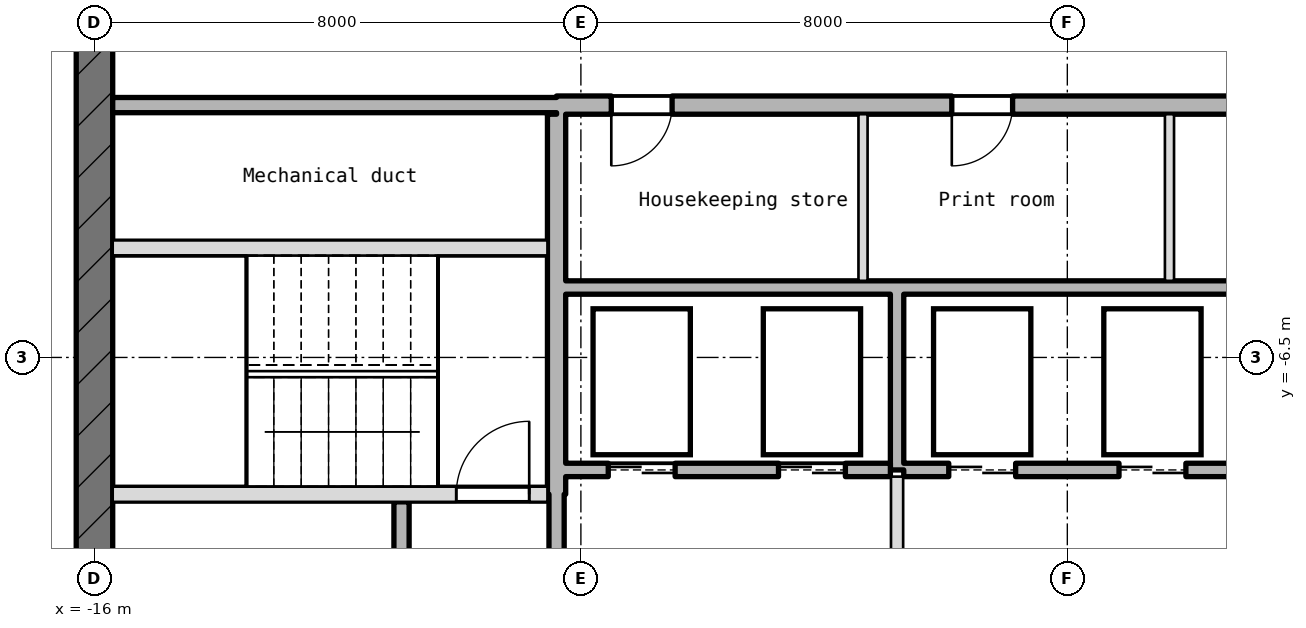
"""IFC4 building model, lengths in metres.
Left out: names, types, materials, properties, quantities, classifications, styles, units other than length and angle.
Written with IfcOpenShell. Run it as: python <this file> out.ifc"""

import sys

from ifc_helpers import new_model, si_unit, direction, frame, frame_2d, origin, place, context, subcontext, project, spatial, rectangle, extrude, element, fill, save


model = new_model("IFC4")
c1 = context("Model", 3, precision=1e-05, world=origin(), true_north=direction((0.0, 1.0)))
c2 = subcontext(c1, "Body", "Model", "MODEL_VIEW")
j1 = project(units=[si_unit("LENGTHUNIT", "METRE"), si_unit("PLANEANGLEUNIT", "RADIAN")], contexts=[c1])
p1 = place(None, origin())
s1 = spatial("IfcSite", under=j1, at=p1, CompositionType="ELEMENT")
p2 = place(p1, origin())
s2 = spatial("IfcBuilding", under=s1, at=p2, CompositionType="ELEMENT")
p3 = place(p2, frame((0.0, 0.0, 418.55)))
s3 = spatial("IfcBuildingStorey", under=s2, at=p3, CompositionType="ELEMENT", Elevation=418.55)
p4 = place(p3, frame((-16.0, 10.124, -0.2), z_axis=(0.0, 0.0, 1.0), x_axis=(0.0, -1.0, 0.0)))
e1 = element("IfcWall", 1, at=p4, inside=s3, PredefinedType="SHEAR", context=c2, shape_type="SweptSolid", body=[
    extrude(rectangle(XDim=20.249, YDim=0.6, at=frame_2d((10.124, 0.0))), origin(), (0.0, 0.0, 1.0), 4.9),
])
p5 = place(p4, frame((8.924, 0.0, 0.2)))
e2 = element("IfcOpeningElement", 2, at=p5, cuts=e1, PredefinedType="OPENING", context=c2, shape_type="SweptSolid", body=[
    extrude(rectangle(XDim=2.4, YDim=2.1, at=frame_2d((1.2, 1.05))), frame((0.0, 0.31, 0.0), z_axis=(0.0, -1.0, 0.0), x_axis=(1.0, 0.0, 0.0)), (0.0, 0.0, 1.0), 0.62),
])
p6 = place(p4, frame((5.524, 0.0, 0.2)))
e3 = element("IfcOpeningElement", 3, at=p6, cuts=e1, PredefinedType="OPENING", context=c2, shape_type="SweptSolid", body=[
    extrude(rectangle(XDim=1.2, YDim=2.1, at=frame_2d((0.6, 1.05))), frame((0.0, 0.31, 0.0), z_axis=(0.0, -1.0, 0.0), x_axis=(1.0, 0.0, 0.0)), (0.0, 0.0, 1.0), 0.62),
])
p7 = place(p3, frame((-15.7, -8.75, -0.2), z_axis=(0.0, 0.0, 1.0), x_axis=(1.0, 0.0, 0.0)))
e4 = element("IfcWall", 4, at=p7, inside=s3, PredefinedType="SHEAR", context=c2, shape_type="SweptSolid", body=[
    extrude(rectangle(XDim=7.15, YDim=0.25, at=frame_2d((3.575, 0.0))), origin(), (0.0, 0.0, 1.0), 4.9),
])
p8 = place(p7, frame((5.65, 0.0, 0.2)))
e5 = element("IfcOpeningElement", 5, at=p8, cuts=e4, PredefinedType="OPENING", context=c2, shape_type="SweptSolid", body=[
    extrude(rectangle(XDim=1.2, YDim=2.1, at=frame_2d((0.6, 1.05))), frame((0.0, 0.135, 0.0), z_axis=(0.0, -1.0, 0.0), x_axis=(1.0, 0.0, 0.0)), (0.0, 0.0, 1.0), 0.27),
])
p9 = place(p3, frame((-8.25, -8.35, 0.0), z_axis=(0.0, 0.0, 1.0), x_axis=(1.0, 0.0, 0.0)))
e6 = element("IfcWall", 6, at=p9, inside=s3, PredefinedType="STANDARD", context=c2, shape_type="SweptSolid", body=[
    extrude(rectangle(XDim=5.34, YDim=0.22, at=frame_2d((2.67, 0.0))), origin(), (0.0, 0.0, 1.0), 4.7),
])
p10 = place(p9, frame((0.7, 0.0, 0.0)))
e7 = element("IfcOpeningElement", 7, at=p10, cuts=e6, PredefinedType="OPENING", context=c2, shape_type="SweptSolid", body=[
    extrude(rectangle(XDim=1.1, YDim=2.1, at=frame_2d((0.55, 1.05))), frame((0.0, 0.12, 0.0), z_axis=(0.0, -1.0, 0.0), x_axis=(1.0, 0.0, 0.0)), (0.0, 0.0, 1.0), 0.24),
])
p11 = place(p9, frame((3.5, 0.0, 0.0)))
e8 = element("IfcOpeningElement", 8, at=p11, cuts=e6, PredefinedType="OPENING", context=c2, shape_type="SweptSolid", body=[
    extrude(rectangle(XDim=1.1, YDim=2.1, at=frame_2d((0.55, 1.05))), frame((0.0, 0.12, 0.0), z_axis=(0.0, -1.0, 0.0), x_axis=(1.0, 0.0, 0.0)), (0.0, 0.0, 1.0), 0.24),
])
p12 = place(p3, frame((-2.69, -8.35, 0.0), z_axis=(0.0, 0.0, 1.0), x_axis=(1.0, 0.0, 0.0)))
e9 = element("IfcWall", 9, at=p12, inside=s3, PredefinedType="STANDARD", context=c2, shape_type="SweptSolid", body=[
    extrude(rectangle(XDim=10.94, YDim=0.22, at=frame_2d((5.47, 0.0))), origin(), (0.0, 0.0, 1.0), 4.7),
])
p13 = place(p12, frame((0.74, 0.0, 0.0)))
e10 = element("IfcOpeningElement", 10, at=p13, cuts=e9, PredefinedType="OPENING", context=c2, shape_type="SweptSolid", body=[
    extrude(rectangle(XDim=1.1, YDim=2.1, at=frame_2d((0.55, 1.05))), frame((0.0, 0.12, 0.0), z_axis=(0.0, -1.0, 0.0), x_axis=(1.0, 0.0, 0.0)), (0.0, 0.0, 1.0), 0.24),
])
p14 = place(p12, frame((3.54, 0.0, 0.0)))
e11 = element("IfcOpeningElement", 11, at=p14, cuts=e9, PredefinedType="OPENING", context=c2, shape_type="SweptSolid", body=[
    extrude(rectangle(XDim=1.1, YDim=2.1, at=frame_2d((0.55, 1.05))), frame((0.0, 0.12, 0.0), z_axis=(0.0, -1.0, 0.0), x_axis=(1.0, 0.0, 0.0)), (0.0, 0.0, 1.0), 0.24),
])
p15 = place(p3, frame((-8.25, -5.35, 0.0), z_axis=(0.0, 0.0, 1.0), x_axis=(1.0, 0.0, 0.0)))
e12 = element("IfcWall", 12, at=p15, inside=s3, PredefinedType="STANDARD", context=c2, shape_type="SweptSolid", body=[
    extrude(rectangle(XDim=16.5, YDim=0.22, at=frame_2d((8.25, 0.0))), origin(), (0.0, 0.0, 1.0), 4.7),
])
p16 = place(p3, frame((-15.7, -4.7, -0.2), z_axis=(0.0, 0.0, 1.0), x_axis=(1.0, 0.0, 0.0)))
e13 = element("IfcWall", 13, at=p16, inside=s3, PredefinedType="SHEAR", context=c2, shape_type="SweptSolid", body=[
    extrude(rectangle(XDim=7.15, YDim=0.25, at=frame_2d((3.575, 0.0))), origin(), (0.0, 0.0, 1.0), 4.9),
])
p17 = place(p3, frame((-15.7, -2.35, 0.0), z_axis=(0.0, 0.0, 1.0), x_axis=(1.0, 0.0, 0.0)))
e14 = element("IfcWall", 14, at=p17, inside=s3, PredefinedType="STANDARD", context=c2, shape_type="SweptSolid", body=[
    extrude(rectangle(XDim=7.3, YDim=0.25, at=frame_2d((3.65, 0.0))), origin(), (0.0, 0.0, 1.0), 4.7),
])
p18 = place(p3, frame((-8.4, -2.35, -0.2), z_axis=(0.0, 0.0, 1.0), x_axis=(1.0, 0.0, 0.0)))
e15 = element("IfcWall", 15, at=p18, inside=s3, PredefinedType="SHEAR", context=c2, shape_type="SweptSolid", body=[
    extrude(rectangle(XDim=16.8, YDim=0.3, at=frame_2d((8.4, 0.0))), origin(), (0.0, 0.0, 1.0), 4.9),
])
p19 = place(p18, frame((0.9, 0.0, 0.2)))
e16 = element("IfcOpeningElement", 16, at=p19, cuts=e15, PredefinedType="OPENING", context=c2, shape_type="SweptSolid", body=[
    extrude(rectangle(XDim=1.0, YDim=2.1, at=frame_2d((0.5, 1.05))), frame((0.0, 0.16, 0.0), z_axis=(0.0, -1.0, 0.0), x_axis=(1.0, 0.0, 0.0)), (0.0, 0.0, 1.0), 0.32),
])
p20 = place(p18, frame((6.5, 0.0, 0.2)))
e17 = element("IfcOpeningElement", 17, at=p20, cuts=e15, PredefinedType="OPENING", context=c2, shape_type="SweptSolid", body=[
    extrude(rectangle(XDim=1.0, YDim=2.1, at=frame_2d((0.5, 1.05))), frame((0.0, 0.16, 0.0), z_axis=(0.0, -1.0, 0.0), x_axis=(1.0, 0.0, 0.0)), (0.0, 0.0, 1.0), 0.32),
])
p21 = place(p18, frame((14.9, 0.0, 0.2)))
e18 = element("IfcOpeningElement", 18, at=p21, cuts=e15, PredefinedType="OPENING", context=c2, shape_type="SweptSolid", body=[
    extrude(rectangle(XDim=1.0, YDim=2.1, at=frame_2d((0.5, 1.05))), frame((0.0, 0.16, 0.0), z_axis=(0.0, -1.0, 0.0), x_axis=(1.0, 0.0, 0.0)), (0.0, 0.0, 1.0), 0.32),
])
p22 = place(p3, frame((-10.95, -12.7, 0.0), z_axis=(0.0, 0.0, 1.0), x_axis=(0.0, 1.0, 0.0)))
e19 = element("IfcWall", 19, at=p22, inside=s3, PredefinedType="STANDARD", context=c2, shape_type="SweptSolid", body=[
    extrude(rectangle(XDim=3.825, YDim=0.25, at=frame_2d((1.913, 0.0))), origin(), (0.0, 0.0, 1.0), 4.7),
])
p23 = place(p3, frame((-8.4, -12.7, 0.0), z_axis=(0.0, 0.0, 1.0), x_axis=(0.0, 1.0, 0.0)))
e20 = element("IfcWall", 20, at=p23, inside=s3, PredefinedType="STANDARD", context=c2, shape_type="SweptSolid", body=[
    extrude(rectangle(XDim=3.95, YDim=0.25, at=frame_2d((1.975, 0.0))), origin(), (0.0, 0.0, 1.0), 4.7),
])
p24 = place(p23, frame((1.6, 0.0, 0.0)))
e21 = element("IfcOpeningElement", 21, at=p24, cuts=e20, PredefinedType="OPENING", context=c2, shape_type="SweptSolid", body=[
    extrude(rectangle(XDim=1.1, YDim=2.1, at=frame_2d((0.55, 1.05))), frame((0.0, 0.135, 0.0), z_axis=(0.0, -1.0, 0.0), x_axis=(1.0, 0.0, 0.0)), (0.0, 0.0, 1.0), 0.27),
])
p25 = place(p3, frame((-8.4, -8.75, -0.2), z_axis=(0.0, 0.0, 1.0), x_axis=(0.0, 1.0, 0.0)))
e22 = element("IfcWall", 22, at=p25, inside=s3, PredefinedType="SHEAR", context=c2, shape_type="SweptSolid", body=[
    extrude(rectangle(XDim=6.25, YDim=0.3, at=frame_2d((3.125, 0.0))), origin(), (0.0, 0.0, 1.0), 4.9),
])
p26 = place(p3, frame((-3.36, -5.24, 0.0), z_axis=(0.0, 0.0, 1.0), x_axis=(0.0, 1.0, 0.0)))
e23 = element("IfcWall", 23, at=p26, inside=s3, PredefinedType="PARTITIONING", context=c2, shape_type="SweptSolid", body=[
    extrude(rectangle(XDim=2.74, YDim=0.15, at=frame_2d((1.37, 0.0))), origin(), (0.0, 0.0, 1.0), 4.7),
])
p27 = place(p3, frame((-2.8, -12.7, 0.0), z_axis=(0.0, 0.0, 1.0), x_axis=(0.0, 1.0, 0.0)))
e24 = element("IfcWall", 24, at=p27, inside=s3, PredefinedType="PARTITIONING", context=c2, shape_type="SweptSolid", body=[
    extrude(rectangle(XDim=4.24, YDim=0.2, at=frame_2d((2.12, 0.0))), origin(), (0.0, 0.0, 1.0), 4.7),
])
p28 = place(p3, frame((-2.8, -8.35, 0.0), z_axis=(0.0, 0.0, 1.0), x_axis=(0.0, 1.0, 0.0)))
e25 = element("IfcWall", 25, at=p28, inside=s3, PredefinedType="STANDARD", context=c2, shape_type="SweptSolid", body=[
    extrude(rectangle(XDim=2.89, YDim=0.22, at=frame_2d((1.445, 0.0))), origin(), (0.0, 0.0, 1.0), 4.7),
])
p29 = place(p3, frame((1.68, -5.24, 0.0), z_axis=(0.0, 0.0, 1.0), x_axis=(0.0, 1.0, 0.0)))
e26 = element("IfcWall", 26, at=p29, inside=s3, PredefinedType="PARTITIONING", context=c2, shape_type="SweptSolid", body=[
    extrude(rectangle(XDim=2.74, YDim=0.15, at=frame_2d((1.37, 0.0))), origin(), (0.0, 0.0, 1.0), 4.7),
])
p30 = place(p10, origin())
e27 = element("IfcDoor", 27, at=p30, inside=s3, OperationType="DOUBLE_DOOR_SLIDING", PredefinedType="DOOR", context=c2, shape_type="SweptSolid", body=[
    extrude(rectangle(XDim=1.1, YDim=2.1, at=frame_2d((0.55, 1.05))), frame((0.0, 0.025, 0.0), z_axis=(0.0, -1.0, 0.0), x_axis=(1.0, 0.0, 0.0)), (0.0, 0.0, 1.0), 0.05),
])
fill(e7, e27)
p31 = place(p11, origin())
e28 = element("IfcDoor", 28, at=p31, inside=s3, OperationType="DOUBLE_DOOR_SLIDING", PredefinedType="DOOR", context=c2, shape_type="SweptSolid", body=[
    extrude(rectangle(XDim=1.1, YDim=2.1, at=frame_2d((0.55, 1.05))), frame((0.0, 0.025, 0.0), z_axis=(0.0, -1.0, 0.0), x_axis=(1.0, 0.0, 0.0)), (0.0, 0.0, 1.0), 0.05),
])
fill(e8, e28)
p32 = place(p13, origin())
e29 = element("IfcDoor", 29, at=p32, inside=s3, OperationType="DOUBLE_DOOR_SLIDING", PredefinedType="DOOR", context=c2, shape_type="SweptSolid", body=[
    extrude(rectangle(XDim=1.1, YDim=2.1, at=frame_2d((0.55, 1.05))), frame((0.0, 0.025, 0.0), z_axis=(0.0, -1.0, 0.0), x_axis=(1.0, 0.0, 0.0)), (0.0, 0.0, 1.0), 0.05),
])
fill(e10, e29)
p33 = place(p14, origin())
e30 = element("IfcDoor", 30, at=p33, inside=s3, OperationType="DOUBLE_DOOR_SLIDING", PredefinedType="DOOR", context=c2, shape_type="SweptSolid", body=[
    extrude(rectangle(XDim=1.1, YDim=2.1, at=frame_2d((0.55, 1.05))), frame((0.0, 0.025, 0.0), z_axis=(0.0, -1.0, 0.0), x_axis=(1.0, 0.0, 0.0)), (0.0, 0.0, 1.0), 0.05),
])
fill(e11, e30)
p34 = place(p8, origin())
e31 = element("IfcDoor", 31, at=p34, inside=s3, OperationType="SINGLE_SWING_RIGHT", PredefinedType="DOOR", context=c2, shape_type="SweptSolid", body=[
    extrude(rectangle(XDim=1.2, YDim=2.1, at=frame_2d((0.6, 1.05))), frame((0.0, 0.025, 0.0), z_axis=(0.0, -1.0, 0.0), x_axis=(1.0, 0.0, 0.0)), (0.0, 0.0, 1.0), 0.05),
])
fill(e5, e31)
p35 = place(p19, frame((1.0, 0.0, 0.0), z_axis=(0.0, 0.0, 1.0), x_axis=(-1.0, 0.0, 0.0)))
e32 = element("IfcDoor", 32, at=p35, inside=s3, OperationType="SINGLE_SWING_LEFT", PredefinedType="DOOR", context=c2, shape_type="SweptSolid", body=[
    extrude(rectangle(XDim=1.0, YDim=2.1, at=frame_2d((0.5, 1.05))), frame((0.0, 0.025, 0.0), z_axis=(0.0, -1.0, 0.0), x_axis=(1.0, 0.0, 0.0)), (0.0, 0.0, 1.0), 0.05),
])
fill(e16, e32)
p36 = place(p20, frame((1.0, 0.0, 0.0), z_axis=(0.0, 0.0, 1.0), x_axis=(-1.0, 0.0, 0.0)))
e33 = element("IfcDoor", 33, at=p36, inside=s3, OperationType="SINGLE_SWING_LEFT", PredefinedType="DOOR", context=c2, shape_type="SweptSolid", body=[
    extrude(rectangle(XDim=1.0, YDim=2.1, at=frame_2d((0.5, 1.05))), frame((0.0, 0.025, 0.0), z_axis=(0.0, -1.0, 0.0), x_axis=(1.0, 0.0, 0.0)), (0.0, 0.0, 1.0), 0.05),
])
fill(e17, e33)
save(model, sys.argv[1])
